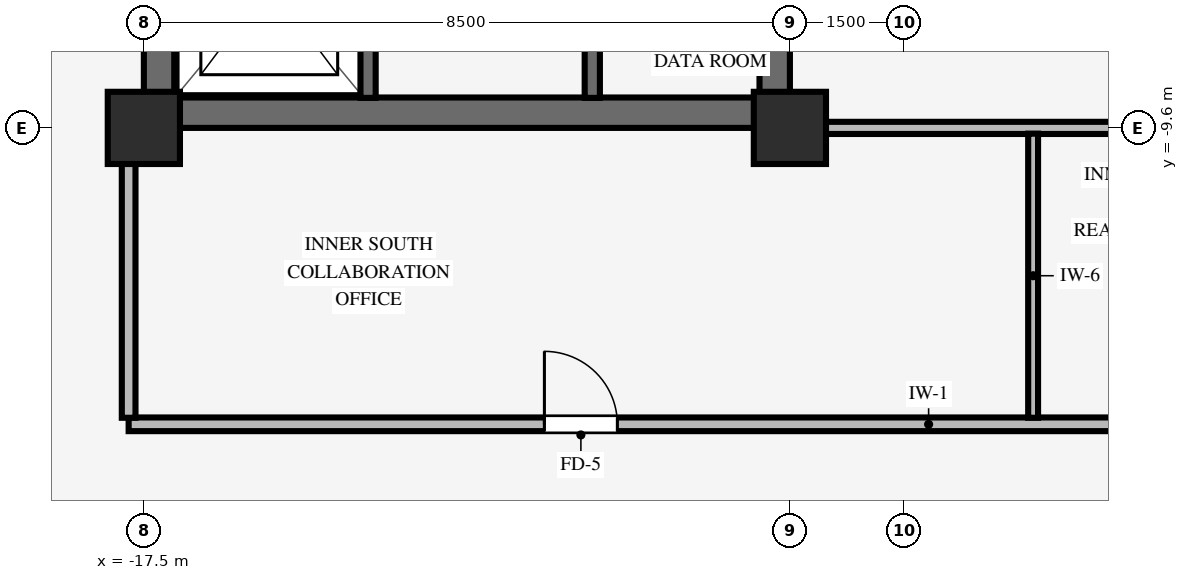
"""IFC4 building model, lengths in metres.
Left out: names, types, materials, properties, quantities, classifications, styles, units other than length and angle.
Written with IfcOpenShell. Run it as: python <this file> out.ifc"""

import sys

from ifc_helpers import new_model, si_unit, direction, frame, frame_2d, origin, origin_2d, place, context, subcontext, project, spatial, rectangle, extrude, source, transform, mapped, element, fill, save


model = new_model("IFC4")
c1 = context("Model", 3, precision=1e-05, world=origin(), true_north=direction((0.0, 1.0)))
c2 = subcontext(c1, "Body", "Model", "MODEL_VIEW")
j1 = project(units=[si_unit("LENGTHUNIT", "METRE"), si_unit("PLANEANGLEUNIT", "RADIAN")], contexts=[c1])
p1 = place(None, origin())
s1 = spatial("IfcSite", under=j1, at=p1, CompositionType="ELEMENT")
p2 = place(p1, origin())
s2 = spatial("IfcBuilding", under=s1, at=p2, CompositionType="ELEMENT")
p3 = place(p2, frame((0.0, 0.0, 178.6)))
s3 = spatial("IfcBuildingStorey", under=s2, at=p3, CompositionType="ELEMENT", Elevation=178.6)
p4 = place(p3, frame((-17.5, -9.4, 0.0), z_axis=(0.0, 0.0, 1.0), x_axis=(1.0, 0.0, 0.0)))
e1 = element("IfcWall", 1, at=p4, inside=s3, PredefinedType="SHEAR", context=c2, shape_type="SweptSolid", body=[
    extrude(rectangle(XDim=8.5, YDim=0.4, at=frame_2d((4.25, 0.0))), origin(), (0.0, 0.0, 1.0), 3.37),
])
p5 = place(p3, frame((-17.3, -9.205, 0.0), z_axis=(0.0, 0.0, 1.0), x_axis=(0.0, 1.0, 0.0)))
e2 = element("IfcWall", 2, at=p5, inside=s3, PredefinedType="SHEAR", context=c2, shape_type="SweptSolid", body=[
    extrude(rectangle(XDim=18.41, YDim=0.4, at=frame_2d((9.205, 0.0))), origin(), (0.0, 0.0, 1.0), 3.37),
])
p6 = place(p3, frame((-9.2, -9.205, 0.0), z_axis=(0.0, 0.0, 1.0), x_axis=(0.0, 1.0, 0.0)))
e3 = element("IfcWall", 3, at=p6, inside=s3, PredefinedType="SHEAR", context=c2, shape_type="SweptSolid", body=[
    extrude(rectangle(XDim=18.41, YDim=0.4, at=frame_2d((9.205, 0.0))), origin(), (0.0, 0.0, 1.0), 3.37),
])
p7 = place(p6, frame((8.605, 0.0, 0.0)))
e4 = element("IfcOpeningElement", 4, at=p7, cuts=e3, PredefinedType="OPENING", context=c2, shape_type="SweptSolid", body=[
    extrude(rectangle(XDim=1.2, YDim=2.15, at=frame_2d((0.6, 1.075))), frame((0.0, 0.21, 0.0), z_axis=(0.0, -1.0, 0.0), x_axis=(1.0, 0.0, 0.0)), (0.0, 0.0, 1.0), 0.42),
])
for number, where, z_axis, x_axis in (
    (5, (-17.5, -9.6, 0.0), (0.0, 0.0, 1.0), (1.0, 0.0, 0.0)),
    (6, (-9.0, -9.6, 0.0), (0.0, 0.0, 1.0), (1.0, 0.0, 0.0)),
):
    element("IfcColumn", number, at=place(p3, frame(where, z_axis=z_axis, x_axis=x_axis)), inside=s3, PredefinedType="COLUMN", context=c2, shape_type="SweptSolid", body=[
        extrude(rectangle(XDim=0.95, YDim=0.95, at=origin_2d()), origin(), (0.0, 0.0, 1.0), 3.37),
    ])
p8 = place(p3, frame((-14.55, -9.205, 0.0), z_axis=(0.0, 0.0, 1.0), x_axis=(0.0, 1.0, 0.0)))
e7 = element("IfcWall", 7, at=p8, inside=s3, PredefinedType="SHEAR", context=c2, shape_type="SweptSolid", body=[
    extrude(rectangle(XDim=3.01, YDim=0.2, at=frame_2d((1.505, 0.0))), origin(), (0.0, 0.0, 1.0), 3.37),
])
p9 = place(p8, frame((0.93, 0.0, 0.0)))
e8 = element("IfcOpeningElement", 8, at=p9, cuts=e7, PredefinedType="OPENING", context=c2, shape_type="SweptSolid", body=[
    extrude(rectangle(XDim=1.15, YDim=2.15, at=frame_2d((0.575, 1.075))), frame((0.0, 0.11, 0.0), z_axis=(0.0, -1.0, 0.0), x_axis=(1.0, 0.0, 0.0)), (0.0, 0.0, 1.0), 0.22),
])
p10 = place(p3, frame((-11.6, -9.205, 0.0), z_axis=(0.0, 0.0, 1.0), x_axis=(0.0, 1.0, 0.0)))
e9 = element("IfcWall", 9, at=p10, inside=s3, PredefinedType="SHEAR", context=c2, shape_type="SweptSolid", body=[
    extrude(rectangle(XDim=7.975, YDim=0.2, at=frame_2d((3.988, 0.0))), origin(), (0.0, 0.0, 1.0), 3.37),
])
p11 = place(p10, frame((1.565, 0.0, 0.0)))
e10 = element("IfcOpeningElement", 10, at=p11, cuts=e9, PredefinedType="OPENING", context=c2, shape_type="SweptSolid", body=[
    extrude(rectangle(XDim=0.88, YDim=2.1, at=frame_2d((0.44, 1.05))), frame((0.0, 0.11, 0.0), z_axis=(0.0, -1.0, 0.0), x_axis=(1.0, 0.0, 0.0)), (0.0, 0.0, 1.0), 0.22),
])
p12 = place(p10, frame((5.565, 0.0, 0.0)))
e11 = element("IfcOpeningElement", 11, at=p12, cuts=e9, PredefinedType="OPENING", context=c2, shape_type="SweptSolid", body=[
    extrude(rectangle(XDim=0.88, YDim=2.1, at=frame_2d((0.44, 1.05))), frame((0.0, 0.11, 0.0), z_axis=(0.0, -1.0, 0.0), x_axis=(1.0, 0.0, 0.0)), (0.0, 0.0, 1.0), 0.22),
])
p13 = place(p3, frame((-17.7, -13.5, 0.0), z_axis=(0.0, 0.0, 1.0), x_axis=(1.0, 0.0, 0.0)))
e12 = element("IfcWall", 12, at=p13, inside=s3, PredefinedType="PARTITIONING", context=c2, shape_type="SweptSolid", body=[
    extrude(rectangle(XDim=24.3, YDim=0.18, at=frame_2d((12.15, 0.0))), origin(), (0.0, 0.0, 1.0), 3.008),
])
p14 = place(p13, frame((5.47, 0.0, 0.0)))
e13 = element("IfcOpeningElement", 13, at=p14, cuts=e12, PredefinedType="OPENING", context=c2, shape_type="SweptSolid", body=[
    extrude(rectangle(XDim=0.96, YDim=2.1, at=frame_2d((0.48, 1.05))), frame((0.0, 0.1, 0.0), z_axis=(0.0, -1.0, 0.0), x_axis=(1.0, 0.0, 0.0)), (0.0, 0.0, 1.0), 0.2),
])
p15 = place(p13, frame((14.62, 0.0, 0.0)))
e14 = element("IfcOpeningElement", 14, at=p15, cuts=e12, PredefinedType="OPENING", context=c2, shape_type="SweptSolid", body=[
    extrude(rectangle(XDim=0.96, YDim=2.1, at=frame_2d((0.48, 1.05))), frame((0.0, 0.1, 0.0), z_axis=(0.0, -1.0, 0.0), x_axis=(1.0, 0.0, 0.0)), (0.0, 0.0, 1.0), 0.2),
])
p16 = place(p13, frame((18.9, 0.0, 0.0)))
e15 = element("IfcOpeningElement", 15, at=p16, cuts=e12, PredefinedType="OPENING", context=c2, shape_type="SweptSolid", body=[
    extrude(rectangle(XDim=0.9, YDim=2.1, at=frame_2d((0.45, 1.05))), frame((0.0, 0.1, 0.0), z_axis=(0.0, -1.0, 0.0), x_axis=(1.0, 0.0, 0.0)), (0.0, 0.0, 1.0), 0.2),
])
p17 = place(p13, frame((21.0, 0.0, 0.0)))
e16 = element("IfcOpeningElement", 16, at=p17, cuts=e12, PredefinedType="OPENING", context=c2, shape_type="SweptSolid", body=[
    extrude(rectangle(XDim=0.9, YDim=2.1, at=frame_2d((0.45, 1.05))), frame((0.0, 0.1, 0.0), z_axis=(0.0, -1.0, 0.0), x_axis=(1.0, 0.0, 0.0)), (0.0, 0.0, 1.0), 0.2),
])
p18 = place(p3, frame((-8.529, -9.6, 0.0), z_axis=(0.0, 0.0, 1.0), x_axis=(1.0, 0.0, 0.0)))
e17 = element("IfcWall", 17, at=p18, inside=s3, PredefinedType="PARTITIONING", context=c2, shape_type="SweptSolid", body=[
    extrude(rectangle(XDim=8.378, YDim=0.16, at=frame_2d((4.189, 0.0))), origin(), (0.0, 0.0, 1.0), 2.405),
])
p19 = place(p3, frame((-17.7, -13.414, 0.0), z_axis=(0.0, 0.0, 1.0), x_axis=(0.0, 1.0, 0.0)))
e18 = element("IfcWall", 18, at=p19, inside=s3, PredefinedType="PARTITIONING", context=c2, shape_type="SweptSolid", body=[
    extrude(rectangle(XDim=3.343, YDim=0.18, at=frame_2d((1.671, 0.0))), origin(), (0.0, 0.0, 1.0), 2.816),
])
p20 = place(p3, frame((-5.8, -13.414, 0.0), z_axis=(0.0, 0.0, 1.0), x_axis=(0.0, 1.0, 0.0)))
e19 = element("IfcWall", 19, at=p20, inside=s3, PredefinedType="PARTITIONING", context=c2, shape_type="SweptSolid", body=[
    extrude(rectangle(XDim=3.738, YDim=0.13, at=frame_2d((1.869, 0.0))), origin(), (0.0, 0.0, 1.0), 3.36),
])
m1 = source(origin(), c2, "Body", "SweptSolid", [
    extrude(rectangle(XDim=0.96, YDim=2.1, at=frame_2d((0.48, 1.05))), frame((0.0, 0.025, 0.0), z_axis=(0.0, -1.0, 0.0), x_axis=(1.0, 0.0, 0.0)), (0.0, 0.0, 1.0), 0.05),
])
p21 = place(p14, origin())
e20 = element("IfcDoor", 20, at=p21, inside=s3, OperationType="SINGLE_SWING_LEFT", PredefinedType="DOOR", context=c2, shape_type="MappedRepresentation", body=[
    mapped(m1, transform((0.0, 0.0, 0.0), scale=1.0)),
])
fill(e13, e20)
save(model, sys.argv[1])
